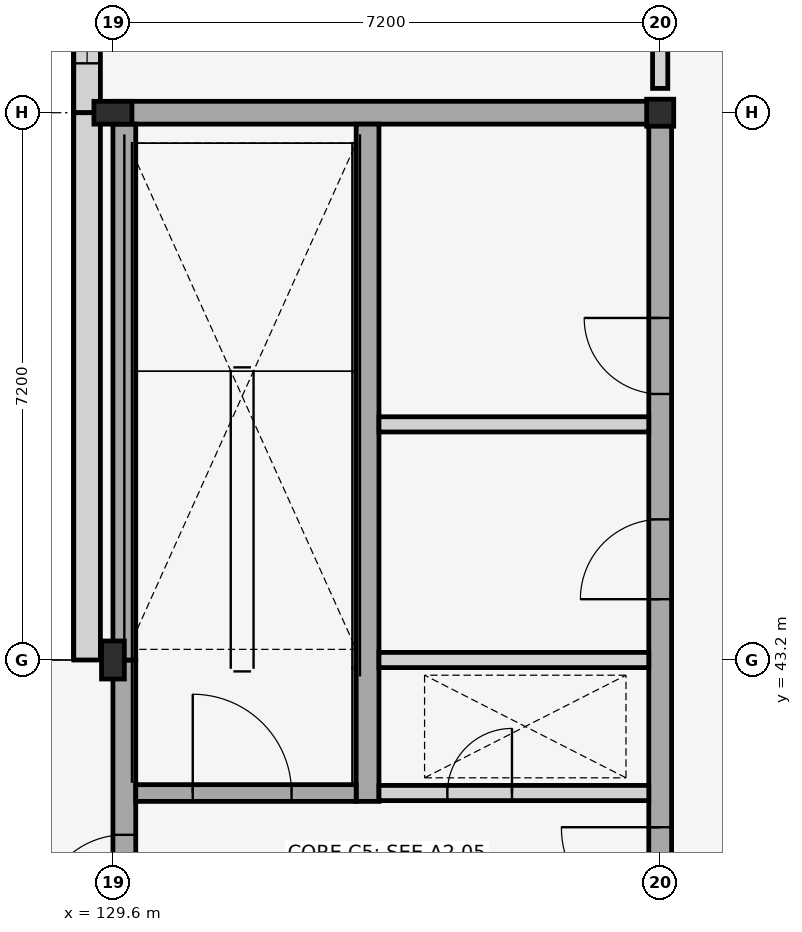
"""IFC4 building model, lengths in metres.
Left out: names, types, materials, properties, quantities, classifications, styles, units other than length and angle.
Written with IfcOpenShell. Run it as: python <this file> out.ifc"""

import sys

from ifc_helpers import new_model, si_unit, direction, frame, frame_2d, origin, origin_2d, place, context, subcontext, project, spatial, rectangle, hollow_circle, i_section, extrude, element, fill, save


model = new_model("IFC4")
c1 = context("Model", 3, precision=1e-05, world=origin(), true_north=direction((0.0, 1.0)))
c2 = subcontext(c1, "Body", "Model", "MODEL_VIEW")
j1 = project(units=[si_unit("LENGTHUNIT", "METRE"), si_unit("PLANEANGLEUNIT", "RADIAN")], contexts=[c1])
p1 = place(None, origin())
s1 = spatial("IfcSite", under=j1, at=p1, CompositionType="ELEMENT")
p2 = place(p1, origin())
s2 = spatial("IfcBuilding", under=s1, at=p2, CompositionType="ELEMENT")
p3 = place(p2, origin())
s3 = spatial("IfcBuildingStorey", under=s2, at=p3, CompositionType="ELEMENT", Elevation=0.0)
for number, where, z_axis, x_axis in (
    (1, (129.6, 43.2, 0.0), (0.0, 0.0, 1.0), (1.0, 0.0, 0.0)),
    (2, (129.6, 50.4, 0.0), (0.0, 0.0, 1.0), (0.0, 1.0, 0.0)),
):
    element("IfcColumn", number, at=place(p3, frame(where, z_axis=z_axis, x_axis=x_axis)), inside=s3, PredefinedType="COLUMN", context=c2, shape_type="SweptSolid", body=[
        extrude(i_section(OverallWidth=0.3, OverallDepth=0.5, WebThickness=0.014, FlangeThickness=0.028, FilletRadius=0.027, at=origin_2d()), origin(), (0.0, 0.0, 1.0), 4.5),
    ])
p4 = place(p3, frame((136.8, 50.4, 0.0), z_axis=(0.0, 0.0, 1.0), x_axis=(1.0, 0.0, 0.0)))
e3 = element("IfcColumn", 3, at=p4, inside=s3, PredefinedType="COLUMN", context=c2, shape_type="SweptSolid", body=[
    extrude(hollow_circle(Radius=0.178, WallThickness=0.014, at=origin_2d()), origin(), (0.0, 0.0, 1.0), 4.5),
])
p5 = place(p3, frame((129.26, 57.6, 0.0), z_axis=(0.0, 0.0, 1.0), x_axis=(0.0, -1.0, 0.0)))
e4 = element("IfcWall", 4, at=p5, inside=s3, PredefinedType="STANDARD", context=c2, shape_type="SweptSolid", body=[
    extrude(rectangle(XDim=7.2, YDim=0.35, at=frame_2d((3.6, 0.0))), origin(), (0.0, 0.0, 1.0), 4.5),
])
p6 = place(p5, frame((2.65, 0.0, 0.0)))
e5 = element("IfcOpeningElement", 5, at=p6, cuts=e4, PredefinedType="OPENING", context=c2, shape_type="SweptSolid", body=[
    extrude(rectangle(XDim=1.9, YDim=2.45, at=frame_2d((0.95, 1.225))), frame((0.0, 0.185, 0.0), z_axis=(0.0, -1.0, 0.0), x_axis=(1.0, 0.0, 0.0)), (0.0, 0.0, 1.0), 0.37),
])
p7 = place(p5, frame((2.55, 0.0, 2.6)))
e6 = element("IfcOpeningElement", 6, at=p7, cuts=e4, PredefinedType="OPENING", context=c2, shape_type="SweptSolid", body=[
    extrude(rectangle(XDim=2.1, YDim=1.15, at=frame_2d((1.05, 0.575))), frame((0.0, 0.185, 0.0), z_axis=(0.0, -1.0, 0.0), x_axis=(1.0, 0.0, 0.0)), (0.0, 0.0, 1.0), 0.37),
])
p8 = place(p5, frame((0.65, 0.0, 0.35)))
e7 = element("IfcOpeningElement", 7, at=p8, cuts=e4, PredefinedType="OPENING", context=c2, shape_type="SweptSolid", body=[
    extrude(rectangle(XDim=1.1, YDim=2.0, at=frame_2d((0.55, 1.0))), frame((0.0, 0.185, 0.0), z_axis=(0.0, -1.0, 0.0), x_axis=(1.0, 0.0, 0.0)), (0.0, 0.0, 1.0), 0.37),
])
p9 = place(p5, frame((5.45, 0.0, 0.35)))
e8 = element("IfcOpeningElement", 8, at=p9, cuts=e4, PredefinedType="OPENING", context=c2, shape_type="SweptSolid", body=[
    extrude(rectangle(XDim=1.1, YDim=2.0, at=frame_2d((0.55, 1.0))), frame((0.0, 0.185, 0.0), z_axis=(0.0, -1.0, 0.0), x_axis=(1.0, 0.0, 0.0)), (0.0, 0.0, 1.0), 0.37),
])
p10 = place(p3, frame((129.26, 50.4, 0.0), z_axis=(0.0, 0.0, 1.0), x_axis=(0.0, -1.0, 0.0)))
e9 = element("IfcWall", 9, at=p10, inside=s3, PredefinedType="STANDARD", context=c2, shape_type="SweptSolid", body=[
    extrude(rectangle(XDim=7.2, YDim=0.35, at=frame_2d((3.6, 0.0))), origin(), (0.0, 0.0, 1.0), 4.5),
])
p11 = place(p3, frame((129.6, 50.4, 0.0), z_axis=(0.0, 0.0, 1.0), x_axis=(1.0, 0.0, 0.0)))
e10 = element("IfcWall", 10, at=p11, inside=s3, PredefinedType="SHEAR", context=c2, shape_type="SweptSolid", body=[
    extrude(rectangle(XDim=7.35, YDim=0.3, at=frame_2d((3.675, 0.0))), origin(), (0.0, 0.0, 1.0), 4.28),
])
p12 = place(p3, frame((129.75, 36.15, 0.0), z_axis=(0.0, 0.0, 1.0), x_axis=(0.0, 1.0, 0.0)))
e11 = element("IfcWall", 11, at=p12, inside=s3, PredefinedType="SHEAR", context=c2, shape_type="SweptSolid", body=[
    extrude(rectangle(XDim=7.05, YDim=0.3, at=frame_2d((3.525, 0.0))), origin(), (0.0, 0.0, 1.0), 4.28),
])
p13 = place(p12, frame((3.65, 0.0, 0.0)))
e12 = element("IfcOpeningElement", 12, at=p13, cuts=e11, PredefinedType="OPENING", context=c2, shape_type="SweptSolid", body=[
    extrude(rectangle(XDim=1.1, YDim=2.2, at=frame_2d((0.55, 1.1))), frame((0.0, 0.16, 0.0), z_axis=(0.0, -1.0, 0.0), x_axis=(1.0, 0.0, 0.0)), (0.0, 0.0, 1.0), 0.32),
])
p14 = place(p3, frame((129.75, 43.2, 0.0), z_axis=(0.0, 0.0, 1.0), x_axis=(0.0, 1.0, 0.0)))
e13 = element("IfcWall", 13, at=p14, inside=s3, PredefinedType="SHEAR", context=c2, shape_type="SweptSolid", body=[
    extrude(rectangle(XDim=7.05, YDim=0.3, at=frame_2d((3.525, 0.0))), origin(), (0.0, 0.0, 1.0), 4.28),
])
p15 = place(p3, frame((136.8, 36.15, 0.0), z_axis=(0.0, 0.0, 1.0), x_axis=(0.0, 1.0, 0.0)))
e14 = element("IfcWall", 14, at=p15, inside=s3, PredefinedType="SHEAR", context=c2, shape_type="SweptSolid", body=[
    extrude(rectangle(XDim=14.1, YDim=0.3, at=frame_2d((7.05, 0.0))), origin(), (0.0, 0.0, 1.0), 4.28),
])
p16 = place(p15, frame((3.55, 0.0, 0.0)))
e15 = element("IfcOpeningElement", 15, at=p16, cuts=e14, PredefinedType="OPENING", context=c2, shape_type="SweptSolid", body=[
    extrude(rectangle(XDim=1.3, YDim=2.2, at=frame_2d((0.65, 1.1))), frame((0.0, 0.16, 0.0), z_axis=(0.0, -1.0, 0.0), x_axis=(1.0, 0.0, 0.0)), (0.0, 0.0, 1.0), 0.32),
])
p17 = place(p15, frame((7.85, 0.0, 0.0)))
e16 = element("IfcOpeningElement", 16, at=p17, cuts=e14, PredefinedType="OPENING", context=c2, shape_type="SweptSolid", body=[
    extrude(rectangle(XDim=1.05, YDim=2.15, at=frame_2d((0.525, 1.075))), frame((0.0, 0.16, 0.0), z_axis=(0.0, -1.0, 0.0), x_axis=(1.0, 0.0, 0.0)), (0.0, 0.0, 1.0), 0.32),
])
p18 = place(p15, frame((10.55, 0.0, 0.0)))
e17 = element("IfcOpeningElement", 17, at=p18, cuts=e14, PredefinedType="OPENING", context=c2, shape_type="SweptSolid", body=[
    extrude(rectangle(XDim=1.0, YDim=2.15, at=frame_2d((0.5, 1.075))), frame((0.0, 0.16, 0.0), z_axis=(0.0, -1.0, 0.0), x_axis=(1.0, 0.0, 0.0)), (0.0, 0.0, 1.0), 0.32),
])
p19 = place(p3, frame((132.95, 41.34, 0.0), z_axis=(0.0, 0.0, 1.0), x_axis=(0.0, 1.0, 0.0)))
e18 = element("IfcWall", 18, at=p19, inside=s3, PredefinedType="SHEAR", context=c2, shape_type="SweptSolid", body=[
    extrude(rectangle(XDim=8.91, YDim=0.3, at=frame_2d((4.455, 0.0))), origin(), (0.0, 0.0, 1.0), 4.28),
])
p20 = place(p3, frame((133.1, 41.45, 0.0), z_axis=(0.0, 0.0, 1.0), x_axis=(1.0, 0.0, 0.0)))
e19 = element("IfcWall", 19, at=p20, inside=s3, PredefinedType="PLUMBINGWALL", context=c2, shape_type="SweptSolid", body=[
    extrude(rectangle(XDim=3.55, YDim=0.2, at=frame_2d((1.775, 0.0))), origin(), (0.0, 0.0, 1.0), 3.7),
])
p21 = place(p20, frame((0.9, 0.0, 0.0)))
e20 = element("IfcOpeningElement", 20, at=p21, cuts=e19, PredefinedType="OPENING", context=c2, shape_type="SweptSolid", body=[
    extrude(rectangle(XDim=0.85, YDim=2.05, at=frame_2d((0.425, 1.025))), frame((0.0, 0.11, 0.0), z_axis=(0.0, -1.0, 0.0), x_axis=(1.0, 0.0, 0.0)), (0.0, 0.0, 1.0), 0.22),
])
p22 = place(p3, frame((129.9, 41.45, 0.0), z_axis=(0.0, 0.0, 1.0), x_axis=(1.0, 0.0, 0.0)))
e21 = element("IfcWall", 21, at=p22, inside=s3, PredefinedType="SHEAR", context=c2, shape_type="SweptSolid", body=[
    extrude(rectangle(XDim=2.9, YDim=0.22, at=frame_2d((1.45, 0.0))), origin(), (0.0, 0.0, 1.0), 4.28),
])
p23 = place(p22, frame((0.75, 0.0, 0.0)))
e22 = element("IfcOpeningElement", 22, at=p23, cuts=e21, PredefinedType="OPENING", context=c2, shape_type="SweptSolid", body=[
    extrude(rectangle(XDim=1.3, YDim=2.2, at=frame_2d((0.65, 1.1))), frame((0.0, 0.12, 0.0), z_axis=(0.0, -1.0, 0.0), x_axis=(1.0, 0.0, 0.0)), (0.0, 0.0, 1.0), 0.24),
])
for number, where, z_axis, x_axis in (
    (23, (133.1, 43.2, 0.0), (0.0, 0.0, 1.0), (1.0, 0.0, 0.0)),
    (24, (133.1, 46.3, 0.0), (0.0, 0.0, 1.0), (1.0, 0.0, 0.0)),
):
    element("IfcWall", number, at=place(p3, frame(where, z_axis=z_axis, x_axis=x_axis)), inside=s3, PredefinedType="PLUMBINGWALL", context=c2, shape_type="SweptSolid", body=[
        extrude(rectangle(XDim=3.55, YDim=0.2, at=frame_2d((1.775, 0.0))), origin(), (0.0, 0.0, 1.0), 3.7),
    ])
p24 = place(p3, frame((136.8, 50.72, 0.0), z_axis=(0.0, 0.0, 1.0), x_axis=(0.0, 1.0, 0.0)))
e25 = element("IfcWall", 25, at=p24, inside=s3, PredefinedType="PARTITIONING", context=c2, shape_type="SweptSolid", body=[
    extrude(rectangle(XDim=24.56, YDim=0.2, at=frame_2d((12.28, 0.0))), origin(), (0.0, 0.0, 1.0), 3.45),
])
p25 = place(p24, frame((11.53, 0.0, 0.0)))
e26 = element("IfcOpeningElement", 26, at=p25, cuts=e25, PredefinedType="OPENING", context=c2, shape_type="SweptSolid", body=[
    extrude(rectangle(XDim=1.5, YDim=2.25, at=frame_2d((0.75, 1.125))), frame((0.0, 0.11, 0.0), z_axis=(0.0, -1.0, 0.0), x_axis=(1.0, 0.0, 0.0)), (0.0, 0.0, 1.0), 0.22),
])
p26 = place(p9, origin())
e27 = element("IfcWindow", 27, at=p26, inside=s3, PartitioningType="SINGLE_PANEL", PredefinedType="WINDOW", context=c2, shape_type="SweptSolid", body=[
    extrude(rectangle(XDim=1.1, YDim=2.0, at=frame_2d((0.55, 1.0))), frame((0.0, 0.03, 0.0), z_axis=(0.0, -1.0, 0.0), x_axis=(1.0, 0.0, 0.0)), (0.0, 0.0, 1.0), 0.06),
])
fill(e8, e27)
p27 = place(p13, origin())
e28 = element("IfcDoor", 28, at=p27, inside=s3, OperationType="SINGLE_SWING_LEFT", PredefinedType="DOOR", context=c2, shape_type="SweptSolid", body=[
    extrude(rectangle(XDim=1.1, YDim=2.2, at=frame_2d((0.55, 1.1))), frame((0.0, 0.025, 0.0), z_axis=(0.0, -1.0, 0.0), x_axis=(1.0, 0.0, 0.0)), (0.0, 0.0, 1.0), 0.05),
])
fill(e12, e28)
p28 = place(p16, origin())
e29 = element("IfcDoor", 29, at=p28, inside=s3, OperationType="SINGLE_SWING_RIGHT", PredefinedType="DOOR", context=c2, shape_type="SweptSolid", body=[
    extrude(rectangle(XDim=1.3, YDim=2.2, at=frame_2d((0.65, 1.1))), frame((0.0, 0.025, 0.0), z_axis=(0.0, -1.0, 0.0), x_axis=(1.0, 0.0, 0.0)), (0.0, 0.0, 1.0), 0.05),
])
fill(e15, e29)
p29 = place(p17, origin())
e30 = element("IfcDoor", 30, at=p29, inside=s3, OperationType="SINGLE_SWING_LEFT", PredefinedType="DOOR", context=c2, shape_type="SweptSolid", body=[
    extrude(rectangle(XDim=1.05, YDim=2.15, at=frame_2d((0.525, 1.075))), frame((0.0, 0.025, 0.0), z_axis=(0.0, -1.0, 0.0), x_axis=(1.0, 0.0, 0.0)), (0.0, 0.0, 1.0), 0.05),
])
fill(e16, e30)
p30 = place(p18, origin())
e31 = element("IfcDoor", 31, at=p30, inside=s3, OperationType="SINGLE_SWING_RIGHT", PredefinedType="DOOR", context=c2, shape_type="SweptSolid", body=[
    extrude(rectangle(XDim=1.0, YDim=2.15, at=frame_2d((0.5, 1.075))), frame((0.0, 0.025, 0.0), z_axis=(0.0, -1.0, 0.0), x_axis=(1.0, 0.0, 0.0)), (0.0, 0.0, 1.0), 0.05),
])
fill(e17, e31)
p31 = place(p21, origin())
e32 = element("IfcDoor", 32, at=p31, inside=s3, OperationType="SINGLE_SWING_RIGHT", PredefinedType="TRAPDOOR", context=c2, shape_type="SweptSolid", body=[
    extrude(rectangle(XDim=0.85, YDim=2.05, at=frame_2d((0.425, 1.025))), frame((0.0, 0.025, 0.0), z_axis=(0.0, -1.0, 0.0), x_axis=(1.0, 0.0, 0.0)), (0.0, 0.0, 1.0), 0.05),
])
fill(e20, e32)
p32 = place(p23, origin())
e33 = element("IfcDoor", 33, at=p32, inside=s3, OperationType="SINGLE_SWING_LEFT", PredefinedType="DOOR", context=c2, shape_type="SweptSolid", body=[
    extrude(rectangle(XDim=1.3, YDim=2.2, at=frame_2d((0.65, 1.1))), frame((0.0, 0.025, 0.0), z_axis=(0.0, -1.0, 0.0), x_axis=(1.0, 0.0, 0.0)), (0.0, 0.0, 1.0), 0.05),
])
fill(e22, e33)
save(model, sys.argv[1])
